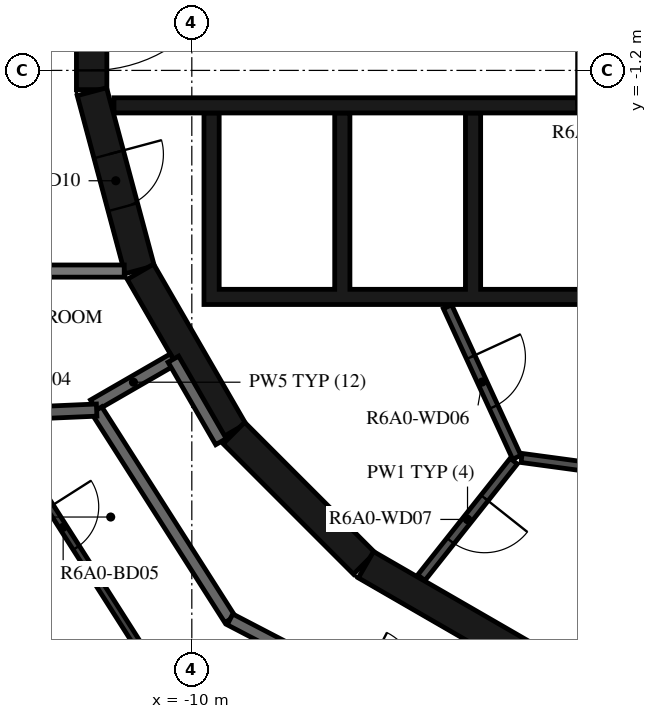
"""IFC4 building model, lengths in metres.
Left out: names, types, materials, properties, quantities, classifications, styles, units other than length and angle.
Written with IfcOpenShell. Run it as: python <this file> out.ifc"""

import sys

from ifc_helpers import new_model, si_unit, direction, frame, frame_2d, origin, place, context, subcontext, project, spatial, polyline, rectangle, outline, extrude, element, fill, save


model = new_model("IFC4")
c1 = context("Model", 3, precision=1e-05, world=origin(), true_north=direction((0.0, 1.0)))
c2 = subcontext(c1, "Body", "Model", "MODEL_VIEW")
j1 = project(units=[si_unit("LENGTHUNIT", "METRE"), si_unit("PLANEANGLEUNIT", "RADIAN")], contexts=[c1])
p1 = place(None, origin())
s1 = spatial("IfcSite", under=j1, at=p1, CompositionType="ELEMENT")
p2 = place(p1, origin())
s2 = spatial("IfcBuilding", under=s1, at=p2, CompositionType="ELEMENT")
p3 = place(p2, frame((0.0, 0.0, 233.7)))
s3 = spatial("IfcBuildingStorey", under=s2, at=p3, CompositionType="ELEMENT", Elevation=233.7)
p4 = place(p3, frame((-11.647, 1.516, 0.0), z_axis=(0.0, 0.0, 1.0), x_axis=(0.0, -1.0, 0.0)))
e1 = element("IfcWall", 1, at=p4, inside=s3, PredefinedType="SHEAR", context=c2, shape_type="SweptSolid", body=[
    extrude(rectangle(XDim=3.033, YDim=0.5, at=frame_2d((1.516, 0.0))), origin(), (0.0, 0.0, 1.0), 3.12),
])
p5 = place(p4, frame((0.316, 0.0, 0.0)))
e2 = element("IfcOpeningElement", 2, at=p5, cuts=e1, PredefinedType="OPENING", context=c2, shape_type="SweptSolid", body=[
    extrude(rectangle(XDim=2.4, YDim=2.1, at=frame_2d((1.2, 1.05))), frame((0.0, 0.26, 0.0), z_axis=(0.0, -1.0, 0.0), x_axis=(1.0, 0.0, 0.0)), (0.0, 0.0, 1.0), 0.52),
])
p6 = place(p3, frame((-11.643, -1.55, 0.0), z_axis=(0.0, 0.0, 1.0), x_axis=(0.258734743916, -0.965948410781, 0.0)))
e3 = element("IfcWall", 3, at=p6, inside=s3, PredefinedType="SHEAR", context=c2, shape_type="SweptSolid", body=[
    extrude(rectangle(XDim=3.033, YDim=0.5, at=frame_2d((1.516, 0.0))), origin(), (0.0, 0.0, 1.0), 3.12),
])
p7 = place(p6, frame((1.066, 0.0, 0.0)))
e4 = element("IfcOpeningElement", 4, at=p7, cuts=e3, PredefinedType="OPENING", context=c2, shape_type="SweptSolid", body=[
    extrude(rectangle(XDim=0.9, YDim=2.1, at=frame_2d((0.45, 1.05))), frame((0.0, 0.26, 0.0), z_axis=(0.0, -1.0, 0.0), x_axis=(1.0, 0.0, 0.0)), (0.0, 0.0, 1.0), 0.52),
])
p8 = place(p3, frame((-10.845, -4.51, 0.0), z_axis=(0.0, 0.0, 1.0), x_axis=(0.500087131594, -0.865975092491, 0.0)))
e5 = element("IfcWall", 5, at=p8, inside=s3, PredefinedType="SHEAR", context=c2, shape_type="SweptSolid", body=[
    extrude(rectangle(XDim=3.033, YDim=0.5, at=frame_2d((1.516, 0.0))), origin(), (0.0, 0.0, 1.0), 3.12),
])
p9 = place(p3, frame((-9.308, -7.164, 0.0), z_axis=(0.0, 0.0, 1.0), x_axis=(0.707106781187, -0.707106781187, 0.0)))
e6 = element("IfcWall", 6, at=p9, inside=s3, PredefinedType="SHEAR", context=c2, shape_type="SweptSolid", body=[
    extrude(rectangle(XDim=3.032, YDim=0.5, at=frame_2d((1.516, 0.0))), origin(), (0.0, 0.0, 1.0), 3.12),
])
p10 = place(p3, frame((-7.137, -9.329, 0.0), z_axis=(0.0, 0.0, 1.0), x_axis=(0.865975092491, -0.500087131594, 0.0)))
e7 = element("IfcWall", 7, at=p10, inside=s3, PredefinedType="SHEAR", context=c2, shape_type="SweptSolid", body=[
    extrude(rectangle(XDim=3.033, YDim=0.5, at=frame_2d((1.516, 0.0))), origin(), (0.0, 0.0, 1.0), 3.12),
])
p11 = place(p3, origin())
e8 = element("IfcWall", 8, at=p11, inside=s3, PredefinedType="SHEAR", context=c2, shape_type="SweptSolid", body=[
    extrude(outline(polyline([(9.8, -5.05), (9.8, -4.8), (9.8, -1.9), (9.55, -1.9), (9.55, -4.8), (7.65, -4.8), (7.65, -1.9), (7.4, -1.9), (7.4, -4.8), (5.5, -4.8), (5.5, -1.9), (5.25, -1.9), (5.25, -4.8), (3.35, -4.8), (3.35, -1.9), (3.1, -1.9), (3.1, -4.8), (1.2, -4.8), (1.2, -1.9), (0.95, -1.9), (0.95, -4.8), (-0.95, -4.8), (-0.95, -1.9), (-1.2, -1.9), (-1.2, -4.8), (-5.25, -4.8), (-5.25, -1.9), (-5.5, -1.9), (-5.5, -4.8), (-7.4, -4.8), (-7.4, -1.9), (-7.65, -1.9), (-7.65, -4.8), (-9.55, -4.8), (-9.55, -1.9), (-9.8, -1.9), (-9.8, -4.8), (-9.8, -5.05), (9.8, -5.05)])), origin(), (0.0, 0.0, 1.0), 3.12),
])
p12 = place(p3, frame((-11.28, -1.775, 0.0), z_axis=(0.0, 0.0, 1.0), x_axis=(1.0, 0.0, 0.0)))
e9 = element("IfcWall", 9, at=p12, inside=s3, PredefinedType="SHEAR", context=c2, shape_type="SweptSolid", body=[
    extrude(rectangle(XDim=14.38, YDim=0.25, at=frame_2d((7.19, 0.0))), origin(), (0.0, 0.0, 1.0), 3.12),
])
p13 = place(p12, frame((12.88, 0.0, 0.0)))
e10 = element("IfcOpeningElement", 10, at=p13, cuts=e9, PredefinedType="OPENING", context=c2, shape_type="SweptSolid", body=[
    extrude(rectangle(XDim=1.1, YDim=2.1, at=frame_2d((0.55, 1.05))), frame((0.0, 0.135, 0.0), z_axis=(0.0, -1.0, 0.0), x_axis=(1.0, 0.0, 0.0)), (0.0, 0.0, 1.0), 0.27),
])
p14 = place(p12, frame((7.605, 0.0, 0.0)))
e11 = element("IfcOpeningElement", 11, at=p14, cuts=e9, PredefinedType="OPENING", context=c2, shape_type="SweptSolid", body=[
    extrude(rectangle(XDim=0.9, YDim=2.1, at=frame_2d((0.45, 1.05))), frame((0.0, 0.135, 0.0), z_axis=(0.0, -1.0, 0.0), x_axis=(1.0, 0.0, 0.0)), (0.0, 0.0, 1.0), 0.27),
])
p15 = place(p12, frame((10.83, 0.0, 0.0)))
e12 = element("IfcOpeningElement", 12, at=p15, cuts=e9, PredefinedType="OPENING", context=c2, shape_type="SweptSolid", body=[
    extrude(rectangle(XDim=0.9, YDim=2.1, at=frame_2d((0.45, 1.05))), frame((0.0, 0.135, 0.0), z_axis=(0.0, -1.0, 0.0), x_axis=(1.0, 0.0, 0.0)), (0.0, 0.0, 1.0), 0.27),
])
p16 = place(p3, frame((-5.795, -5.086, 0.0), z_axis=(0.0, 0.0, 1.0), x_axis=(0.417887867606, -0.908498613157, 0.0)))
e13 = element("IfcWall", 13, at=p16, inside=s3, PredefinedType="PARTITIONING", context=c2, shape_type="SweptSolid", body=[
    extrude(rectangle(XDim=2.726, YDim=0.15, at=frame_2d((1.363, 0.0))), origin(), (0.0, 0.0, 1.0), 3.12),
])
p17 = place(p16, frame((0.913, 0.0, 0.0)))
e14 = element("IfcOpeningElement", 14, at=p17, cuts=e13, PredefinedType="OPENING", context=c2, shape_type="SweptSolid", body=[
    extrude(rectangle(XDim=0.9, YDim=2.1, at=frame_2d((0.45, 1.05))), frame((0.0, 0.085, 0.0), z_axis=(0.0, -1.0, 0.0), x_axis=(1.0, 0.0, 0.0)), (0.0, 0.0, 1.0), 0.17),
])
p18 = place(p3, frame((-4.706, -7.625, 0.0), z_axis=(0.0, 0.0, 1.0), x_axis=(-0.621392599334, -0.783499353856, 0.0)))
e15 = element("IfcWall", 15, at=p18, inside=s3, PredefinedType="PARTITIONING", context=c2, shape_type="SweptSolid", body=[
    extrude(rectangle(XDim=2.447, YDim=0.15, at=frame_2d((1.224, 0.0))), origin(), (0.0, 0.0, 1.0), 3.12),
])
p19 = place(p18, frame((0.774, 0.0, 0.0)))
e16 = element("IfcOpeningElement", 16, at=p19, cuts=e15, PredefinedType="OPENING", context=c2, shape_type="SweptSolid", body=[
    extrude(rectangle(XDim=0.9, YDim=2.1, at=frame_2d((0.45, 1.05))), frame((0.0, 0.085, 0.0), z_axis=(0.0, -1.0, 0.0), x_axis=(1.0, 0.0, 0.0)), (0.0, 0.0, 1.0), 0.17),
])
p20 = place(p3, frame((-2.42, -7.865, 0.0), z_axis=(0.0, 0.0, 1.0), x_axis=(-0.990972299108, 0.134066783362, 0.0)))
e17 = element("IfcWall", 17, at=p20, inside=s3, PredefinedType="PARTITIONING", context=c2, shape_type="SweptSolid", body=[
    extrude(rectangle(XDim=2.176, YDim=0.15, at=frame_2d((1.088, 0.0))), origin(), (0.0, 0.0, 1.0), 3.12),
])
p21 = place(p3, frame((-10.303, -5.949, 0.0), z_axis=(0.0, 0.0, 1.0), x_axis=(-0.866043382451, -0.499968858743, 0.0)))
e18 = element("IfcWall", 18, at=p21, inside=s3, PredefinedType="STANDARD", context=c2, shape_type="SweptSolid", body=[
    extrude(rectangle(XDim=1.515, YDim=0.2, at=frame_2d((0.758, 0.0))), origin(), (0.0, 0.0, 1.0), 3.12),
])
p22 = place(p3, frame((-9.52, -7.305, 0.0), z_axis=(0.0, 0.0, 1.0), x_axis=(-0.500028278809, 0.866009076391, 0.0)))
e19 = element("IfcWall", 19, at=p22, inside=s3, PredefinedType="STANDARD", context=c2, shape_type="SweptSolid", body=[
    extrude(rectangle(XDim=1.566, YDim=0.2, at=frame_2d((0.783, 0.0))), origin(), (0.0, 0.0, 1.0), 3.12),
])
p23 = place(p3, frame((-11.565, -6.786, 0.0), z_axis=(0.0, 0.0, 1.0), x_axis=(0.537297327359, -0.843392898958, 0.0)))
e20 = element("IfcWall", 20, at=p23, inside=s3, PredefinedType="STANDARD", context=c2, shape_type="SweptSolid", body=[
    extrude(rectangle(XDim=4.081, YDim=0.2, at=frame_2d((2.041, 0.0))), origin(), (0.0, 0.0, 1.0), 3.12),
])
p24 = place(p3, frame((-9.372, -10.228, 0.0), z_axis=(0.0, 0.0, 1.0), x_axis=(0.887005184532, -0.461759464021, 0.0)))
e21 = element("IfcWall", 21, at=p24, inside=s3, PredefinedType="STANDARD", context=c2, shape_type="SweptSolid", body=[
    extrude(rectangle(XDim=7.181, YDim=0.2, at=frame_2d((3.591, 0.0))), origin(), (0.0, 0.0, 1.0), 3.12),
])
p25 = place(p24, frame((2.391, 0.0, 0.0)))
e22 = element("IfcOpeningElement", 22, at=p25, cuts=e21, PredefinedType="OPENING", context=c2, shape_type="SweptSolid", body=[
    extrude(rectangle(XDim=1.0, YDim=2.1, at=frame_2d((0.5, 1.05))), frame((0.0, 0.11, 0.0), z_axis=(0.0, -1.0, 0.0), x_axis=(1.0, 0.0, 0.0)), (0.0, 0.0, 1.0), 0.22),
])
p26 = place(p3, frame((-17.655, -4.5, 0.0), z_axis=(0.0, 0.0, 1.0), x_axis=(1.0, 0.0, 0.0)))
e23 = element("IfcWall", 23, at=p26, inside=s3, PredefinedType="STANDARD", context=c2, shape_type="SweptSolid", body=[
    extrude(rectangle(XDim=6.543, YDim=0.2, at=frame_2d((3.272, 0.0))), origin(), (0.0, 0.0, 1.0), 3.12),
])
p27 = place(p3, frame((-13.148, -6.855, 0.0), z_axis=(0.0, 0.0, 1.0), x_axis=(0.999048583464, 0.043611098121, 0.0)))
e24 = element("IfcWall", 24, at=p27, inside=s3, PredefinedType="STANDARD", context=c2, shape_type="SweptSolid", body=[
    extrude(rectangle(XDim=1.584, YDim=0.2, at=frame_2d((0.792, 0.0))), origin(), (0.0, 0.0, 1.0), 3.12),
])
p28 = place(p3, frame((-13.137, -7.111, 0.0), z_axis=(0.0, 0.0, 1.0), x_axis=(0.537300549444, -0.843390846267, 0.0)))
e25 = element("IfcWall", 25, at=p28, inside=s3, PredefinedType="PARTITIONING", context=c2, shape_type="SweptSolid", body=[
    extrude(rectangle(XDim=5.054, YDim=0.12, at=frame_2d((2.527, 0.0))), origin(), (0.0, 0.0, 1.0), 3.12),
])
p29 = place(p28, frame((1.5, 0.0, 0.0)))
e26 = element("IfcOpeningElement", 26, at=p29, cuts=e25, PredefinedType="OPENING", context=c2, shape_type="SweptSolid", body=[
    extrude(rectangle(XDim=0.8, YDim=2.1, at=frame_2d((0.4, 1.05))), frame((0.0, 0.07, 0.0), z_axis=(0.0, -1.0, 0.0), x_axis=(1.0, 0.0, 0.0)), (0.0, 0.0, 1.0), 0.14),
])
p30 = place(p5, origin())
e27 = element("IfcDoor", 27, at=p30, inside=s3, OperationType="DOUBLE_DOOR_SINGLE_SWING", PredefinedType="DOOR", context=c2, shape_type="SweptSolid", body=[
    extrude(rectangle(XDim=2.4, YDim=2.1, at=frame_2d((1.2, 1.05))), frame((0.0, 0.025, 0.0), z_axis=(0.0, -1.0, 0.0), x_axis=(1.0, 0.0, 0.0)), (0.0, 0.0, 1.0), 0.05),
])
fill(e2, e27)
p31 = place(p14, origin())
e28 = element("IfcDoor", 28, at=p31, inside=s3, OperationType="SINGLE_SWING_RIGHT", PredefinedType="DOOR", context=c2, shape_type="SweptSolid", body=[
    extrude(rectangle(XDim=0.9, YDim=2.1, at=frame_2d((0.45, 1.05))), frame((0.0, 0.025, 0.0), z_axis=(0.0, -1.0, 0.0), x_axis=(1.0, 0.0, 0.0)), (0.0, 0.0, 1.0), 0.05),
])
fill(e11, e28)
p32 = place(p17, origin())
e29 = element("IfcDoor", 29, at=p32, inside=s3, OperationType="SINGLE_SWING_RIGHT", PredefinedType="DOOR", context=c2, shape_type="SweptSolid", body=[
    extrude(rectangle(XDim=0.9, YDim=2.1, at=frame_2d((0.45, 1.05))), frame((0.0, 0.025, 0.0), z_axis=(0.0, -1.0, 0.0), x_axis=(1.0, 0.0, 0.0)), (0.0, 0.0, 1.0), 0.05),
])
fill(e14, e29)
p33 = place(p19, origin())
e30 = element("IfcDoor", 30, at=p33, inside=s3, OperationType="SINGLE_SWING_LEFT", PredefinedType="DOOR", context=c2, shape_type="SweptSolid", body=[
    extrude(rectangle(XDim=0.9, YDim=2.1, at=frame_2d((0.45, 1.05))), frame((0.0, 0.025, 0.0), z_axis=(0.0, -1.0, 0.0), x_axis=(1.0, 0.0, 0.0)), (0.0, 0.0, 1.0), 0.05),
])
fill(e16, e30)
p34 = place(p7, origin())
e31 = element("IfcDoor", 31, at=p34, inside=s3, OperationType="SINGLE_SWING_RIGHT", PredefinedType="DOOR", context=c2, shape_type="SweptSolid", body=[
    extrude(rectangle(XDim=0.9, YDim=2.1, at=frame_2d((0.45, 1.05))), frame((0.0, 0.025, 0.0), z_axis=(0.0, -1.0, 0.0), x_axis=(1.0, 0.0, 0.0)), (0.0, 0.0, 1.0), 0.05),
])
fill(e4, e31)
p35 = place(p29, origin())
e32 = element("IfcDoor", 32, at=p35, inside=s3, OperationType="SINGLE_SWING_RIGHT", PredefinedType="DOOR", context=c2, shape_type="SweptSolid", body=[
    extrude(rectangle(XDim=0.8, YDim=2.1, at=frame_2d((0.4, 1.05))), frame((0.0, 0.025, 0.0), z_axis=(0.0, -1.0, 0.0), x_axis=(1.0, 0.0, 0.0)), (0.0, 0.0, 1.0), 0.05),
])
fill(e26, e32)
save(model, sys.argv[1])
